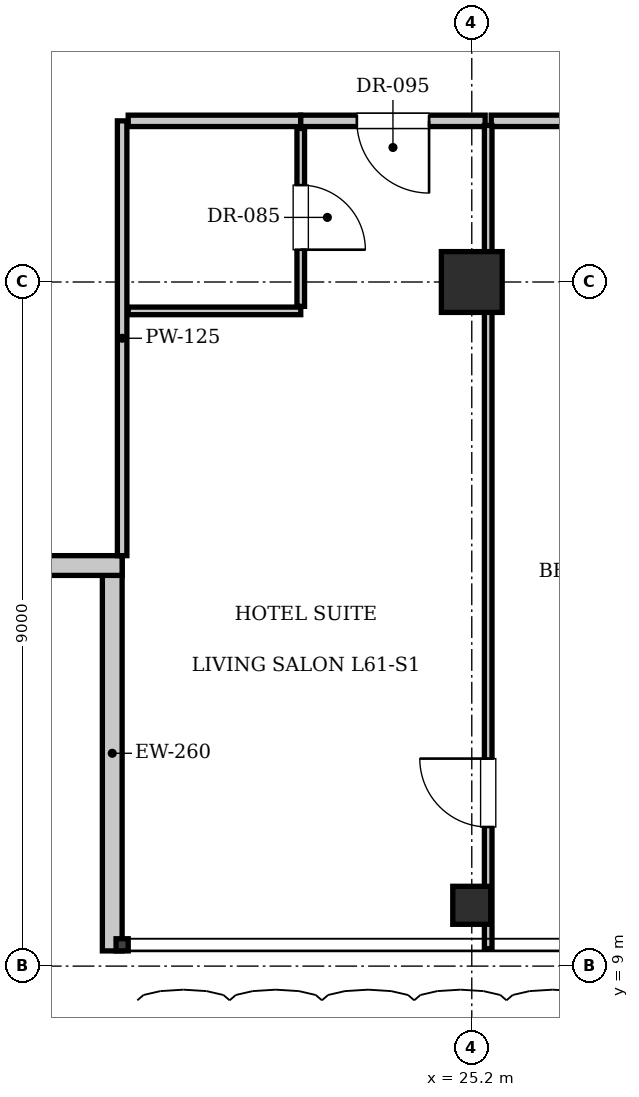
"""IFC4 building model, lengths in metres.
Left out: names, types, materials, properties, quantities, classifications, styles, units other than length and angle.
Written with IfcOpenShell. Run it as: python <this file> out.ifc"""

import sys

from ifc_helpers import new_model, si_unit, direction, frame, frame_2d, origin, origin_2d, place, context, subcontext, project, spatial, rectangle, i_section, extrude, element, fill, save


model = new_model("IFC4")
c1 = context("Model", 3, precision=1e-05, world=origin(), true_north=direction((0.0, 1.0)))
c2 = subcontext(c1, "Body", "Model", "MODEL_VIEW")
j1 = project(units=[si_unit("LENGTHUNIT", "METRE"), si_unit("PLANEANGLEUNIT", "RADIAN")], contexts=[c1])
p1 = place(None, origin())
s1 = spatial("IfcSite", under=j1, at=p1, CompositionType="ELEMENT")
p2 = place(p1, origin())
s2 = spatial("IfcBuilding", under=s1, at=p2, CompositionType="ELEMENT")
p3 = place(p2, frame((0.0, 0.0, 250.95)))
s3 = spatial("IfcBuildingStorey", under=s2, at=p3, CompositionType="ELEMENT", Elevation=250.95)
p4 = place(p3, frame((25.2, 18.0, 0.0), z_axis=(0.0, 0.0, 1.0), x_axis=(1.0, 0.0, 0.0)))
e1 = element("IfcColumn", 1, at=p4, inside=s3, PredefinedType="COLUMN", context=c2, shape_type="SweptSolid", body=[
    extrude(rectangle(XDim=0.8, YDim=0.8, at=origin_2d()), origin(), (0.0, 0.0, 1.0), 3.85),
])
p5 = place(p3, frame((25.2, 9.8, 0.0), z_axis=(0.0, 0.0, 1.0), x_axis=(1.0, 0.0, 0.0)))
e2 = element("IfcColumn", 2, at=p5, inside=s3, PredefinedType="COLUMN", context=c2, shape_type="SweptSolid", body=[
    extrude(i_section(OverallWidth=0.5, OverallDepth=0.5, WebThickness=0.022, FlangeThickness=0.032, at=origin_2d()), origin(), (0.0, 0.0, 1.0), 3.85),
])
p6 = place(p3, frame((20.47, 9.2, 0.0), z_axis=(0.0, 0.0, 1.0), x_axis=(0.0, 1.0, 0.0)))
e3 = element("IfcWall", 3, at=p6, inside=s3, PredefinedType="SOLIDWALL", context=c2, shape_type="SweptSolid", body=[
    extrude(rectangle(XDim=5.2, YDim=0.26, at=frame_2d((2.6, 0.0))), origin(), (0.0, 0.0, 1.0), 3.61),
])
p7 = place(p3, frame((20.6, 14.27, 0.0), z_axis=(0.0, 0.0, 1.0), x_axis=(-1.0, 0.0, 0.0)))
e4 = element("IfcWall", 4, at=p7, inside=s3, PredefinedType="SOLIDWALL", context=c2, shape_type="SweptSolid", body=[
    extrude(rectangle(XDim=5.2, YDim=0.26, at=frame_2d((2.6, 0.0))), origin(), (0.0, 0.0, 1.0), 3.61),
])
p8 = place(p7, frame((1.6, 0.0, 0.9)))
e5 = element("IfcOpeningElement", 5, at=p8, cuts=e4, PredefinedType="OPENING", context=c2, shape_type="SweptSolid", body=[
    extrude(rectangle(XDim=2.0, YDim=2.2, at=frame_2d((1.0, 1.1))), frame((0.0, 0.14, 0.0), z_axis=(0.0, -1.0, 0.0), x_axis=(1.0, 0.0, 0.0)), (0.0, 0.0, 1.0), 0.28),
])
p9 = place(p3, frame((20.6, 14.4, 0.0), z_axis=(0.0, 0.0, 1.0), x_axis=(0.0, 1.0, 0.0)))
e6 = element("IfcWall", 6, at=p9, inside=s3, PredefinedType="PARTITIONING", context=c2, shape_type="SweptSolid", body=[
    extrude(rectangle(XDim=5.72, YDim=0.125, at=frame_2d((2.86, 0.0))), origin(), (0.0, 0.0, 1.0), 3.61),
])
p10 = place(p3, frame((20.68, 20.12, 0.0), z_axis=(0.0, 0.0, 1.0), x_axis=(1.0, 0.0, 0.0)))
e7 = element("IfcWall", 7, at=p10, inside=s3, PredefinedType="PARTITIONING", context=c2, shape_type="SweptSolid", body=[
    extrude(rectangle(XDim=2.27, YDim=0.15, at=frame_2d((1.135, 0.0))), origin(), (0.0, 0.0, 1.0), 3.61),
])
p11 = place(p3, frame((20.68, 17.62, 0.0), z_axis=(0.0, 0.0, 1.0), x_axis=(1.0, 0.0, 0.0)))
e8 = element("IfcWall", 8, at=p11, inside=s3, PredefinedType="PARTITIONING", context=c2, shape_type="SweptSolid", body=[
    extrude(rectangle(XDim=2.27, YDim=0.1, at=frame_2d((1.135, 0.0))), origin(), (0.0, 0.0, 1.0), 3.61),
])
p12 = place(p3, frame((22.95, 17.68, 0.0), z_axis=(0.0, 0.0, 1.0), x_axis=(0.0, 1.0, 0.0)))
e9 = element("IfcWall", 9, at=p12, inside=s3, PredefinedType="PARTITIONING", context=c2, shape_type="SweptSolid", body=[
    extrude(rectangle(XDim=2.34, YDim=0.1, at=frame_2d((1.17, 0.0))), origin(), (0.0, 0.0, 1.0), 3.61),
])
p13 = place(p12, frame((0.745, 0.0, 0.0)))
e10 = element("IfcOpeningElement", 10, at=p13, cuts=e9, PredefinedType="OPENING", context=c2, shape_type="SweptSolid", body=[
    extrude(rectangle(XDim=0.85, YDim=2.1, at=frame_2d((0.425, 1.05))), frame((0.0, 0.06, 0.0), z_axis=(0.0, -1.0, 0.0), x_axis=(1.0, 0.0, 0.0)), (0.0, 0.0, 1.0), 0.12),
])
p14 = place(p3, frame((22.95, 20.12, 0.0), z_axis=(0.0, 0.0, 1.0), x_axis=(1.0, 0.0, 0.0)))
e11 = element("IfcWall", 11, at=p14, inside=s3, PredefinedType="PARTITIONING", context=c2, shape_type="SweptSolid", body=[
    extrude(rectangle(XDim=2.426, YDim=0.15, at=frame_2d((1.213, 0.0))), origin(), (0.0, 0.0, 1.0), 3.61),
])
p15 = place(p14, frame((0.738, 0.0, 0.0)))
e12 = element("IfcOpeningElement", 12, at=p15, cuts=e11, PredefinedType="OPENING", context=c2, shape_type="SweptSolid", body=[
    extrude(rectangle(XDim=0.95, YDim=2.15, at=frame_2d((0.475, 1.075))), frame((0.0, 0.085, 0.0), z_axis=(0.0, -1.0, 0.0), x_axis=(1.0, 0.0, 0.0)), (0.0, 0.0, 1.0), 0.17),
])
p16 = place(p3, frame((25.456, 20.12, 0.0), z_axis=(0.0, 0.0, 1.0), x_axis=(1.0, 0.0, 0.0)))
e13 = element("IfcWall", 13, at=p16, inside=s3, PredefinedType="PARTITIONING", context=c2, shape_type="SweptSolid", body=[
    extrude(rectangle(XDim=3.724, YDim=0.15, at=frame_2d((1.862, 0.0))), origin(), (0.0, 0.0, 1.0), 3.61),
])
p17 = place(p3, frame((25.416, 9.23, 0.0), z_axis=(0.0, 0.0, 1.0), x_axis=(0.0, 1.0, 0.0)))
e14 = element("IfcWall", 14, at=p17, inside=s3, PredefinedType="PARTITIONING", context=c2, shape_type="SweptSolid", body=[
    extrude(rectangle(XDim=10.83, YDim=0.1, at=frame_2d((5.415, 0.0))), origin(), (0.0, 0.0, 1.0), 3.61),
])
p18 = place(p17, frame((1.6, 0.0, 0.0)))
e15 = element("IfcOpeningElement", 15, at=p18, cuts=e14, PredefinedType="OPENING", context=c2, shape_type="SweptSolid", body=[
    extrude(rectangle(XDim=0.9, YDim=2.1, at=frame_2d((0.45, 1.05))), frame((0.0, 0.06, 0.0), z_axis=(0.0, -1.0, 0.0), x_axis=(1.0, 0.0, 0.0)), (0.0, 0.0, 1.0), 0.12),
])
p19 = place(p13, frame((0.85, 0.0, 0.0), z_axis=(0.0, 0.0, 1.0), x_axis=(-1.0, 0.0, 0.0)))
e16 = element("IfcDoor", 16, at=p19, inside=s3, OperationType="SINGLE_SWING_RIGHT", PredefinedType="DOOR", context=c2, shape_type="SweptSolid", body=[
    extrude(rectangle(XDim=0.85, YDim=2.1, at=frame_2d((0.425, 1.05))), frame((0.0, 0.025, 0.0), z_axis=(0.0, -1.0, 0.0), x_axis=(1.0, 0.0, 0.0)), (0.0, 0.0, 1.0), 0.05),
])
fill(e10, e16)
p20 = place(p15, frame((0.95, 0.0, 0.0), z_axis=(0.0, 0.0, 1.0), x_axis=(-1.0, 0.0, 0.0)))
e17 = element("IfcDoor", 17, at=p20, inside=s3, OperationType="SINGLE_SWING_LEFT", PredefinedType="DOOR", context=c2, shape_type="SweptSolid", body=[
    extrude(rectangle(XDim=0.95, YDim=2.15, at=frame_2d((0.475, 1.075))), frame((0.0, 0.025, 0.0), z_axis=(0.0, -1.0, 0.0), x_axis=(1.0, 0.0, 0.0)), (0.0, 0.0, 1.0), 0.05),
])
fill(e12, e17)
p21 = place(p18, origin())
e18 = element("IfcDoor", 18, at=p21, inside=s3, OperationType="SINGLE_SWING_RIGHT", PredefinedType="DOOR", context=c2, shape_type="SweptSolid", body=[
    extrude(rectangle(XDim=0.9, YDim=2.1, at=frame_2d((0.45, 1.05))), frame((0.0, 0.025, 0.0), z_axis=(0.0, -1.0, 0.0), x_axis=(1.0, 0.0, 0.0)), (0.0, 0.0, 1.0), 0.05),
])
fill(e15, e18)
save(model, sys.argv[1])
